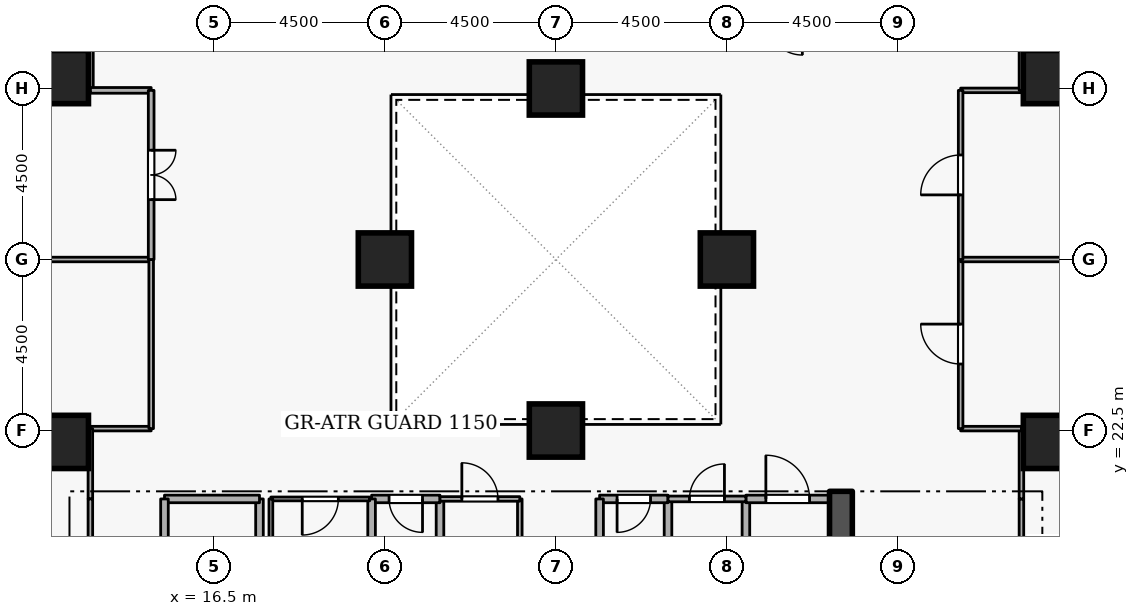
"""IFC4 building model, lengths in metres.
Left out: names, types, materials, properties, quantities, classifications, styles, units other than length and angle.
Written with IfcOpenShell. Run it as: python <this file> out.ifc"""

import sys

from ifc_helpers import new_model, si_unit, direction, frame, frame_2d, origin, origin_2d, place, context, subcontext, project, spatial, rectangle, extrude, element, fill, save


model = new_model("IFC4")
c1 = context("Model", 3, precision=1e-05, world=origin(), true_north=direction((0.0, 1.0)))
c2 = subcontext(c1, "Body", "Model", "MODEL_VIEW")
j1 = project(units=[si_unit("LENGTHUNIT", "METRE"), si_unit("PLANEANGLEUNIT", "RADIAN")], contexts=[c1])
p1 = place(None, origin())
s1 = spatial("IfcSite", under=j1, at=p1, CompositionType="ELEMENT")
p2 = place(p1, origin())
s2 = spatial("IfcBuilding", under=s1, at=p2, CompositionType="ELEMENT")
p3 = place(p2, frame((0.0, 0.0, 27.9)))
s3 = spatial("IfcBuildingStorey", under=s2, at=p3, CompositionType="ELEMENT", Elevation=27.9)
p4 = place(p3, frame((33.0, 15.2, 0.0), z_axis=(0.0, 0.0, 1.0), x_axis=(0.0, 1.0, 0.0)))
e1 = element("IfcWall", 1, at=p4, inside=s3, PredefinedType="SHEAR", context=c2, shape_type="SweptSolid", body=[
    extrude(rectangle(XDim=5.7, YDim=0.6, at=frame_2d((2.85, 0.0))), origin(), (0.0, 0.0, 1.0), 3.6),
])
for number, where, z_axis, x_axis in (
    (2, (12.5, 22.2, 0.0), (0.0, 0.0, 1.0), (1.0, 0.0, 0.0)),
    (3, (38.5, 22.2, 0.0), (0.0, 0.0, 1.0), (1.0, 0.0, 0.0)),
    (4, (12.5, 31.8, 0.0), (0.0, 0.0, 1.0), (1.0, 0.0, 0.0)),
    (5, (38.5, 31.8, 0.0), (0.0, 0.0, 1.0), (1.0, 0.0, 0.0)),
    (6, (25.5, 22.5, 0.0), (0.0, 0.0, 1.0), (1.0, 0.0, 0.0)),
    (7, (25.5, 31.5, 0.0), (0.0, 0.0, 1.0), (1.0, 0.0, 0.0)),
    (8, (21.0, 27.0, 0.0), (0.0, 0.0, 1.0), (1.0, 0.0, 0.0)),
    (9, (30.0, 27.0, 0.0), (0.0, 0.0, 1.0), (1.0, 0.0, 0.0)),
):
    element("IfcColumn", number, at=place(p3, frame(where, z_axis=z_axis, x_axis=x_axis)), inside=s3, PredefinedType="COLUMN", context=c2, shape_type="SweptSolid", body=[
        extrude(rectangle(XDim=1.4, YDim=1.4, at=origin_2d()), origin(), (0.0, 0.0, 1.0), 3.6),
    ])
p5 = place(p3, frame((17.7, 18.4, 0.0), z_axis=(0.0, 0.0, 1.0), x_axis=(0.0, 1.0, 0.0)))
e10 = element("IfcWall", 10, at=p5, inside=s3, PredefinedType="STANDARD", context=c2, shape_type="SweptSolid", body=[
    extrude(rectangle(XDim=2.3, YDim=0.2, at=frame_2d((1.15, 0.0))), origin(), (0.0, 0.0, 1.0), 2.545),
])
p6 = place(p3, frame((17.7, 20.7, 0.0), z_axis=(0.0, 0.0, 1.0), x_axis=(-1.0, 0.0, 0.0)))
e11 = element("IfcWall", 11, at=p6, inside=s3, PredefinedType="STANDARD", context=c2, shape_type="SweptSolid", body=[
    extrude(rectangle(XDim=2.5, YDim=0.2, at=frame_2d((1.25, 0.0))), origin(), (0.0, 0.0, 1.0), 3.34),
])
p7 = place(p3, frame((15.2, 20.7, 0.0), z_axis=(0.0, 0.0, 1.0), x_axis=(0.0, -1.0, 0.0)))
e12 = element("IfcWall", 12, at=p7, inside=s3, PredefinedType="STANDARD", context=c2, shape_type="SweptSolid", body=[
    extrude(rectangle(XDim=5.7, YDim=0.2, at=frame_2d((2.85, 0.0))), origin(), (0.0, 0.0, 1.0), 3.34),
])
p8 = place(p7, frame((2.275, 0.0, 0.0)))
e13 = element("IfcOpeningElement", 13, at=p8, cuts=e12, PredefinedType="OPENING", context=c2, shape_type="SweptSolid", body=[
    extrude(rectangle(XDim=1.15, YDim=2.1, at=frame_2d((0.575, 1.05))), frame((0.0, 0.11, 0.0), z_axis=(0.0, -1.0, 0.0), x_axis=(1.0, 0.0, 0.0)), (0.0, 0.0, 1.0), 0.22),
])
p9 = place(p3, frame((28.45, 18.65, 0.0), z_axis=(0.0, 0.0, 1.0), x_axis=(0.0, 1.0, 0.0)))
e14 = element("IfcWall", 14, at=p9, inside=s3, PredefinedType="STANDARD", context=c2, shape_type="SweptSolid", body=[
    extrude(rectangle(XDim=2.05, YDim=0.2, at=frame_2d((1.025, 0.0))), origin(), (0.0, 0.0, 1.0), 3.34),
])
p10 = place(p3, frame((28.45, 20.7, 0.0), z_axis=(0.0, 0.0, 1.0), x_axis=(-1.0, 0.0, 0.0)))
e15 = element("IfcWall", 15, at=p10, inside=s3, PredefinedType="STANDARD", context=c2, shape_type="SweptSolid", body=[
    extrude(rectangle(XDim=1.8, YDim=0.2, at=frame_2d((0.9, 0.0))), origin(), (0.0, 0.0, 1.0), 3.34),
])
p11 = place(p10, frame((0.46, 0.0, 0.0)))
e16 = element("IfcOpeningElement", 16, at=p11, cuts=e15, PredefinedType="OPENING", context=c2, shape_type="SweptSolid", body=[
    extrude(rectangle(XDim=0.88, YDim=2.04, at=frame_2d((0.44, 1.02))), frame((0.0, 0.11, 0.0), z_axis=(0.0, -1.0, 0.0), x_axis=(1.0, 0.0, 0.0)), (0.0, 0.0, 1.0), 0.22),
])
for number, where, z_axis, x_axis in (
    (17, (26.65, 20.7, 0.0), (0.0, 0.0, 1.0), (0.0, -1.0, 0.0)),
    (18, (22.45, 18.65, 0.0), (0.0, 0.0, 1.0), (0.0, 1.0, 0.0)),
):
    element("IfcWall", number, at=place(p3, frame(where, z_axis=z_axis, x_axis=x_axis)), inside=s3, PredefinedType="STANDARD", context=c2, shape_type="SweptSolid", body=[
        extrude(rectangle(XDim=2.05, YDim=0.2, at=frame_2d((1.025, 0.0))), origin(), (0.0, 0.0, 1.0), 3.34),
    ])
p12 = place(p3, frame((22.45, 20.7, 0.0), z_axis=(0.0, 0.0, 1.0), x_axis=(-1.0, 0.0, 0.0)))
e19 = element("IfcWall", 19, at=p12, inside=s3, PredefinedType="STANDARD", context=c2, shape_type="SweptSolid", body=[
    extrude(rectangle(XDim=1.8, YDim=0.2, at=frame_2d((0.9, 0.0))), origin(), (0.0, 0.0, 1.0), 3.34),
])
p13 = place(p12, frame((0.46, 0.0, 0.0)))
e20 = element("IfcOpeningElement", 20, at=p13, cuts=e19, PredefinedType="OPENING", context=c2, shape_type="SweptSolid", body=[
    extrude(rectangle(XDim=0.88, YDim=2.04, at=frame_2d((0.44, 1.02))), frame((0.0, 0.11, 0.0), z_axis=(0.0, -1.0, 0.0), x_axis=(1.0, 0.0, 0.0)), (0.0, 0.0, 1.0), 0.22),
])
for number, where, z_axis, x_axis in (
    (21, (20.65, 20.7, 0.0), (0.0, 0.0, 1.0), (0.0, -1.0, 0.0)),
    (22, (30.5, 18.65, 0.0), (0.0, 0.0, 1.0), (0.0, 1.0, 0.0)),
):
    element("IfcWall", number, at=place(p3, frame(where, z_axis=z_axis, x_axis=x_axis)), inside=s3, PredefinedType="STANDARD", context=c2, shape_type="SweptSolid", body=[
        extrude(rectangle(XDim=2.05, YDim=0.2, at=frame_2d((1.025, 0.0))), origin(), (0.0, 0.0, 1.0), 3.34),
    ])
p14 = place(p3, frame((30.5, 20.7, 0.0), z_axis=(0.0, 0.0, 1.0), x_axis=(1.0, 0.0, 0.0)))
e23 = element("IfcWall", 23, at=p14, inside=s3, PredefinedType="STANDARD", context=c2, shape_type="SweptSolid", body=[
    extrude(rectangle(XDim=2.2, YDim=0.2, at=frame_2d((1.1, 0.0))), origin(), (0.0, 0.0, 1.0), 3.34),
])
p15 = place(p14, frame((0.525, 0.0, 0.0)))
e24 = element("IfcOpeningElement", 24, at=p15, cuts=e23, PredefinedType="OPENING", context=c2, shape_type="SweptSolid", body=[
    extrude(rectangle(XDim=1.15, YDim=2.1, at=frame_2d((0.575, 1.05))), frame((0.0, 0.11, 0.0), z_axis=(0.0, -1.0, 0.0), x_axis=(1.0, 0.0, 0.0)), (0.0, 0.0, 1.0), 0.22),
])
p16 = place(p3, frame((20.6, 20.7, 0.0), z_axis=(0.0, 0.0, 1.0), x_axis=(-1.0, 0.0, 0.0)))
e25 = element("IfcWall", 25, at=p16, inside=s3, PredefinedType="PARTITIONING", context=c2, shape_type="SweptSolid", body=[
    extrude(rectangle(XDim=2.6, YDim=0.1, at=frame_2d((1.3, 0.0))), origin(), (0.0, 0.0, 1.0), 3.34),
])
p17 = place(p16, frame((0.825, 0.0, 0.0)))
e26 = element("IfcOpeningElement", 26, at=p17, cuts=e25, PredefinedType="OPENING", context=c2, shape_type="SweptSolid", body=[
    extrude(rectangle(XDim=0.95, YDim=2.1, at=frame_2d((0.475, 1.05))), frame((0.0, 0.06, 0.0), z_axis=(0.0, -1.0, 0.0), x_axis=(1.0, 0.0, 0.0)), (0.0, 0.0, 1.0), 0.12),
])
p18 = place(p3, frame((18.0, 20.7, 0.0), z_axis=(0.0, 0.0, 1.0), x_axis=(0.0, -1.0, 0.0)))
e27 = element("IfcWall", 27, at=p18, inside=s3, PredefinedType="PARTITIONING", context=c2, shape_type="SweptSolid", body=[
    extrude(rectangle(XDim=2.05, YDim=0.1, at=frame_2d((1.025, 0.0))), origin(), (0.0, 0.0, 1.0), 2.545),
])
p19 = place(p3, frame((24.55, 20.7, 0.0), z_axis=(0.0, 0.0, 1.0), x_axis=(0.0, -1.0, 0.0)))
e28 = element("IfcWall", 28, at=p19, inside=s3, PredefinedType="PARTITIONING", context=c2, shape_type="SweptSolid", body=[
    extrude(rectangle(XDim=2.05, YDim=0.12, at=frame_2d((1.025, 0.0))), origin(), (0.0, 0.0, 1.0), 3.34),
])
p20 = place(p3, frame((22.45, 20.7, 0.0), z_axis=(0.0, 0.0, 1.0), x_axis=(1.0, 0.0, 0.0)))
e29 = element("IfcWall", 29, at=p20, inside=s3, PredefinedType="PARTITIONING", context=c2, shape_type="SweptSolid", body=[
    extrude(rectangle(XDim=2.1, YDim=0.12, at=frame_2d((1.05, 0.0))), origin(), (0.0, 0.0, 1.0), 3.34),
])
p21 = place(p20, frame((0.575, 0.0, 0.0)))
e30 = element("IfcOpeningElement", 30, at=p21, cuts=e29, PredefinedType="OPENING", context=c2, shape_type="SweptSolid", body=[
    extrude(rectangle(XDim=0.95, YDim=2.1, at=frame_2d((0.475, 1.05))), frame((0.0, 0.07, 0.0), z_axis=(0.0, -1.0, 0.0), x_axis=(1.0, 0.0, 0.0)), (0.0, 0.0, 1.0), 0.14),
])
p22 = place(p3, frame((28.45, 20.7, 0.0), z_axis=(0.0, 0.0, 1.0), x_axis=(1.0, 0.0, 0.0)))
e31 = element("IfcWall", 31, at=p22, inside=s3, PredefinedType="PARTITIONING", context=c2, shape_type="SweptSolid", body=[
    extrude(rectangle(XDim=2.05, YDim=0.15, at=frame_2d((1.025, 0.0))), origin(), (0.0, 0.0, 1.0), 3.34),
])
p23 = place(p22, frame((0.565, 0.0, 0.0)))
e32 = element("IfcOpeningElement", 32, at=p23, cuts=e31, PredefinedType="OPENING", context=c2, shape_type="SweptSolid", body=[
    extrude(rectangle(XDim=0.92, YDim=2.08, at=frame_2d((0.46, 1.04))), frame((0.0, 0.085, 0.0), z_axis=(0.0, -1.0, 0.0), x_axis=(1.0, 0.0, 0.0)), (0.0, 0.0, 1.0), 0.17),
])
p24 = place(p3, frame((14.85, 22.55, 0.0), z_axis=(0.0, 0.0, 1.0), x_axis=(-1.0, 0.0, 0.0)))
e33 = element("IfcWall", 33, at=p24, inside=s3, PredefinedType="PARTITIONING", context=c2, shape_type="SweptSolid", body=[
    extrude(rectangle(XDim=1.6, YDim=0.12, at=frame_2d((0.8, 0.0))), origin(), (0.0, 0.0, 1.0), 3.34),
])
p25 = place(p3, frame((13.25, 22.55, 0.0), z_axis=(0.0, 0.0, 1.0), x_axis=(0.0, -1.0, 0.0)))
e34 = element("IfcWall", 34, at=p25, inside=s3, PredefinedType="PARTITIONING", context=c2, shape_type="SweptSolid", body=[
    extrude(rectangle(XDim=1.85, YDim=0.12, at=frame_2d((0.925, 0.0))), origin(), (0.0, 0.0, 1.0), 3.34),
])
p26 = place(p3, frame((13.25, 20.7, 0.0), z_axis=(0.0, 0.0, 1.0), x_axis=(0.0, -1.0, 0.0)))
e35 = element("IfcWall", 35, at=p26, inside=s3, PredefinedType="PARTITIONING", context=c2, shape_type="SweptSolid", body=[
    extrude(rectangle(XDim=9.35, YDim=0.12, at=frame_2d((4.675, 0.0))), origin(), (0.0, 0.0, 1.0), 3.34),
])
p27 = place(p26, frame((4.15, 0.0, 0.0)))
e36 = element("IfcOpeningElement", 36, at=p27, cuts=e35, PredefinedType="OPENING", context=c2, shape_type="SweptSolid", body=[
    extrude(rectangle(XDim=1.05, YDim=2.1, at=frame_2d((0.525, 1.05))), frame((0.0, 0.07, 0.0), z_axis=(0.0, -1.0, 0.0), x_axis=(1.0, 0.0, 0.0)), (0.0, 0.0, 1.0), 0.14),
])
p28 = place(p3, frame((1.28, 27.0, 0.0), z_axis=(0.0, 0.0, 1.0), x_axis=(1.0, 0.0, 0.0)))
e37 = element("IfcWall", 37, at=p28, inside=s3, PredefinedType="PARTITIONING", context=c2, shape_type="SweptSolid", body=[
    extrude(rectangle(XDim=13.57, YDim=0.12, at=frame_2d((6.785, 0.0))), origin(), (0.0, 0.0, 1.0), 2.878),
])
p29 = place(p3, frame((14.85, 27.0, 0.0), z_axis=(0.0, 0.0, 1.0), x_axis=(0.0, -1.0, 0.0)))
e38 = element("IfcWall", 38, at=p29, inside=s3, PredefinedType="PARTITIONING", context=c2, shape_type="SweptSolid", body=[
    extrude(rectangle(XDim=4.45, YDim=0.12, at=frame_2d((2.225, 0.0))), origin(), (0.0, 0.0, 1.0), 3.34),
])
p30 = place(p3, frame((13.25, 33.3, 0.0), z_axis=(0.0, 0.0, 1.0), x_axis=(0.0, -1.0, 0.0)))
e39 = element("IfcWall", 39, at=p30, inside=s3, PredefinedType="PARTITIONING", context=c2, shape_type="SweptSolid", body=[
    extrude(rectangle(XDim=1.85, YDim=0.15, at=frame_2d((0.925, 0.0))), origin(), (0.0, 0.0, 1.0), 3.34),
])
p31 = place(p3, frame((13.25, 31.45, 0.0), z_axis=(0.0, 0.0, 1.0), x_axis=(1.0, 0.0, 0.0)))
e40 = element("IfcWall", 40, at=p31, inside=s3, PredefinedType="PARTITIONING", context=c2, shape_type="SweptSolid", body=[
    extrude(rectangle(XDim=1.6, YDim=0.15, at=frame_2d((0.8, 0.0))), origin(), (0.0, 0.0, 1.0), 3.34),
])
p32 = place(p3, frame((14.85, 31.45, 0.0), z_axis=(0.0, 0.0, 1.0), x_axis=(0.0, -1.0, 0.0)))
e41 = element("IfcWall", 41, at=p32, inside=s3, PredefinedType="PARTITIONING", context=c2, shape_type="SweptSolid", body=[
    extrude(rectangle(XDim=4.45, YDim=0.15, at=frame_2d((2.225, 0.0))), origin(), (0.0, 0.0, 1.0), 3.34),
])
p33 = place(p32, frame((1.575, 0.0, 0.0)))
e42 = element("IfcOpeningElement", 42, at=p33, cuts=e41, PredefinedType="OPENING", context=c2, shape_type="SweptSolid", body=[
    extrude(rectangle(XDim=1.3, YDim=2.12, at=frame_2d((0.65, 1.06))), frame((0.0, 0.085, 0.0), z_axis=(0.0, -1.0, 0.0), x_axis=(1.0, 0.0, 0.0)), (0.0, 0.0, 1.0), 0.17),
])
p34 = place(p3, frame((37.75, 17.55, 0.0), z_axis=(0.0, 0.0, 1.0), x_axis=(0.0, 1.0, 0.0)))
e43 = element("IfcWall", 43, at=p34, inside=s3, PredefinedType="PARTITIONING", context=c2, shape_type="SweptSolid", body=[
    extrude(rectangle(XDim=3.15, YDim=0.12, at=frame_2d((1.575, 0.0))), origin(), (0.0, 0.0, 1.0), 3.34),
])
p35 = place(p3, frame((37.75, 20.7, 0.0), z_axis=(0.0, 0.0, 1.0), x_axis=(0.0, 1.0, 0.0)))
e44 = element("IfcWall", 44, at=p35, inside=s3, PredefinedType="PARTITIONING", context=c2, shape_type="SweptSolid", body=[
    extrude(rectangle(XDim=1.85, YDim=0.12, at=frame_2d((0.925, 0.0))), origin(), (0.0, 0.0, 1.0), 3.34),
])
p36 = place(p3, frame((37.75, 22.55, 0.0), z_axis=(0.0, 0.0, 1.0), x_axis=(-1.0, 0.0, 0.0)))
e45 = element("IfcWall", 45, at=p36, inside=s3, PredefinedType="PARTITIONING", context=c2, shape_type="SweptSolid", body=[
    extrude(rectangle(XDim=1.6, YDim=0.12, at=frame_2d((0.8, 0.0))), origin(), (0.0, 0.0, 1.0), 3.34),
])
p37 = place(p3, frame((36.15, 22.55, 0.0), z_axis=(0.0, 0.0, 1.0), x_axis=(0.0, 1.0, 0.0)))
e46 = element("IfcWall", 46, at=p37, inside=s3, PredefinedType="PARTITIONING", context=c2, shape_type="SweptSolid", body=[
    extrude(rectangle(XDim=4.45, YDim=0.12, at=frame_2d((2.225, 0.0))), origin(), (0.0, 0.0, 1.0), 3.34),
])
p38 = place(p37, frame((1.7, 0.0, 0.0)))
e47 = element("IfcOpeningElement", 47, at=p38, cuts=e46, PredefinedType="OPENING", context=c2, shape_type="SweptSolid", body=[
    extrude(rectangle(XDim=1.05, YDim=2.1, at=frame_2d((0.525, 1.05))), frame((0.0, 0.07, 0.0), z_axis=(0.0, -1.0, 0.0), x_axis=(1.0, 0.0, 0.0)), (0.0, 0.0, 1.0), 0.14),
])
p39 = place(p3, frame((36.15, 27.0, 0.0), z_axis=(0.0, 0.0, 1.0), x_axis=(1.0, 0.0, 0.0)))
e48 = element("IfcWall", 48, at=p39, inside=s3, PredefinedType="PARTITIONING", context=c2, shape_type="SweptSolid", body=[
    extrude(rectangle(XDim=7.57, YDim=0.12, at=frame_2d((3.785, 0.0))), origin(), (0.0, 0.0, 1.0), 2.878),
])
p40 = place(p3, frame((36.15, 31.45, 0.0), z_axis=(0.0, 0.0, 1.0), x_axis=(1.0, 0.0, 0.0)))
e49 = element("IfcWall", 49, at=p40, inside=s3, PredefinedType="PARTITIONING", context=c2, shape_type="SweptSolid", body=[
    extrude(rectangle(XDim=1.6, YDim=0.12, at=frame_2d((0.8, 0.0))), origin(), (0.0, 0.0, 1.0), 3.34),
])
p41 = place(p3, frame((37.75, 31.45, 0.0), z_axis=(0.0, 0.0, 1.0), x_axis=(0.0, 1.0, 0.0)))
e50 = element("IfcWall", 50, at=p41, inside=s3, PredefinedType="PARTITIONING", context=c2, shape_type="SweptSolid", body=[
    extrude(rectangle(XDim=1.85, YDim=0.12, at=frame_2d((0.925, 0.0))), origin(), (0.0, 0.0, 1.0), 3.34),
])
p42 = place(p3, frame((36.15, 27.0, 0.0), z_axis=(0.0, 0.0, 1.0), x_axis=(0.0, 1.0, 0.0)))
e51 = element("IfcWall", 51, at=p42, inside=s3, PredefinedType="PARTITIONING", context=c2, shape_type="SweptSolid", body=[
    extrude(rectangle(XDim=4.45, YDim=0.12, at=frame_2d((2.225, 0.0))), origin(), (0.0, 0.0, 1.0), 3.34),
])
p43 = place(p42, frame((1.7, 0.0, 0.0)))
e52 = element("IfcOpeningElement", 52, at=p43, cuts=e51, PredefinedType="OPENING", context=c2, shape_type="SweptSolid", body=[
    extrude(rectangle(XDim=1.05, YDim=2.1, at=frame_2d((0.525, 1.05))), frame((0.0, 0.07, 0.0), z_axis=(0.0, -1.0, 0.0), x_axis=(1.0, 0.0, 0.0)), (0.0, 0.0, 1.0), 0.14),
])
p44 = place(p11, origin())
e53 = element("IfcDoor", 53, at=p44, inside=s3, OperationType="SINGLE_SWING_RIGHT", PredefinedType="DOOR", context=c2, shape_type="SweptSolid", body=[
    extrude(rectangle(XDim=0.88, YDim=2.04, at=frame_2d((0.44, 1.02))), frame((0.0, 0.025, 0.0), z_axis=(0.0, -1.0, 0.0), x_axis=(1.0, 0.0, 0.0)), (0.0, 0.0, 1.0), 0.05),
])
fill(e16, e53)
p45 = place(p13, origin())
e54 = element("IfcDoor", 54, at=p45, inside=s3, OperationType="SINGLE_SWING_LEFT", PredefinedType="DOOR", context=c2, shape_type="SweptSolid", body=[
    extrude(rectangle(XDim=0.88, YDim=2.04, at=frame_2d((0.44, 1.02))), frame((0.0, 0.025, 0.0), z_axis=(0.0, -1.0, 0.0), x_axis=(1.0, 0.0, 0.0)), (0.0, 0.0, 1.0), 0.05),
])
fill(e20, e54)
p46 = place(p17, origin())
e55 = element("IfcDoor", 55, at=p46, inside=s3, OperationType="SINGLE_SWING_RIGHT", PredefinedType="DOOR", context=c2, shape_type="SweptSolid", body=[
    extrude(rectangle(XDim=0.95, YDim=2.1, at=frame_2d((0.475, 1.05))), frame((0.0, 0.025, 0.0), z_axis=(0.0, -1.0, 0.0), x_axis=(1.0, 0.0, 0.0)), (0.0, 0.0, 1.0), 0.05),
])
fill(e26, e55)
p47 = place(p21, origin())
e56 = element("IfcDoor", 56, at=p47, inside=s3, OperationType="SINGLE_SWING_LEFT", PredefinedType="DOOR", context=c2, shape_type="SweptSolid", body=[
    extrude(rectangle(XDim=0.95, YDim=2.1, at=frame_2d((0.475, 1.05))), frame((0.0, 0.025, 0.0), z_axis=(0.0, -1.0, 0.0), x_axis=(1.0, 0.0, 0.0)), (0.0, 0.0, 1.0), 0.05),
])
fill(e30, e56)
p48 = place(p23, origin())
e57 = element("IfcDoor", 57, at=p48, inside=s3, OperationType="SINGLE_SWING_RIGHT", PredefinedType="DOOR", context=c2, shape_type="SweptSolid", body=[
    extrude(rectangle(XDim=0.92, YDim=2.08, at=frame_2d((0.46, 1.04))), frame((0.0, 0.025, 0.0), z_axis=(0.0, -1.0, 0.0), x_axis=(1.0, 0.0, 0.0)), (0.0, 0.0, 1.0), 0.05),
])
fill(e32, e57)
p49 = place(p15, origin())
e58 = element("IfcDoor", 58, at=p49, inside=s3, OperationType="SINGLE_SWING_LEFT", PredefinedType="DOOR", context=c2, shape_type="SweptSolid", body=[
    extrude(rectangle(XDim=1.15, YDim=2.1, at=frame_2d((0.575, 1.05))), frame((0.0, 0.025, 0.0), z_axis=(0.0, -1.0, 0.0), x_axis=(1.0, 0.0, 0.0)), (0.0, 0.0, 1.0), 0.05),
])
fill(e24, e58)
p50 = place(p33, origin())
e59 = element("IfcDoor", 59, at=p50, inside=s3, OperationType="DOUBLE_DOOR_SINGLE_SWING", PredefinedType="DOOR", context=c2, shape_type="SweptSolid", body=[
    extrude(rectangle(XDim=1.3, YDim=2.12, at=frame_2d((0.65, 1.06))), frame((0.0, 0.025, 0.0), z_axis=(0.0, -1.0, 0.0), x_axis=(1.0, 0.0, 0.0)), (0.0, 0.0, 1.0), 0.05),
])
fill(e42, e59)
p51 = place(p38, origin())
e60 = element("IfcDoor", 60, at=p51, inside=s3, OperationType="SINGLE_SWING_RIGHT", PredefinedType="DOOR", context=c2, shape_type="SweptSolid", body=[
    extrude(rectangle(XDim=1.05, YDim=2.1, at=frame_2d((0.525, 1.05))), frame((0.0, 0.025, 0.0), z_axis=(0.0, -1.0, 0.0), x_axis=(1.0, 0.0, 0.0)), (0.0, 0.0, 1.0), 0.05),
])
fill(e47, e60)
p52 = place(p43, origin())
e61 = element("IfcDoor", 61, at=p52, inside=s3, OperationType="SINGLE_SWING_LEFT", PredefinedType="DOOR", context=c2, shape_type="SweptSolid", body=[
    extrude(rectangle(XDim=1.05, YDim=2.1, at=frame_2d((0.525, 1.05))), frame((0.0, 0.025, 0.0), z_axis=(0.0, -1.0, 0.0), x_axis=(1.0, 0.0, 0.0)), (0.0, 0.0, 1.0), 0.05),
])
fill(e52, e61)
save(model, sys.argv[1])
